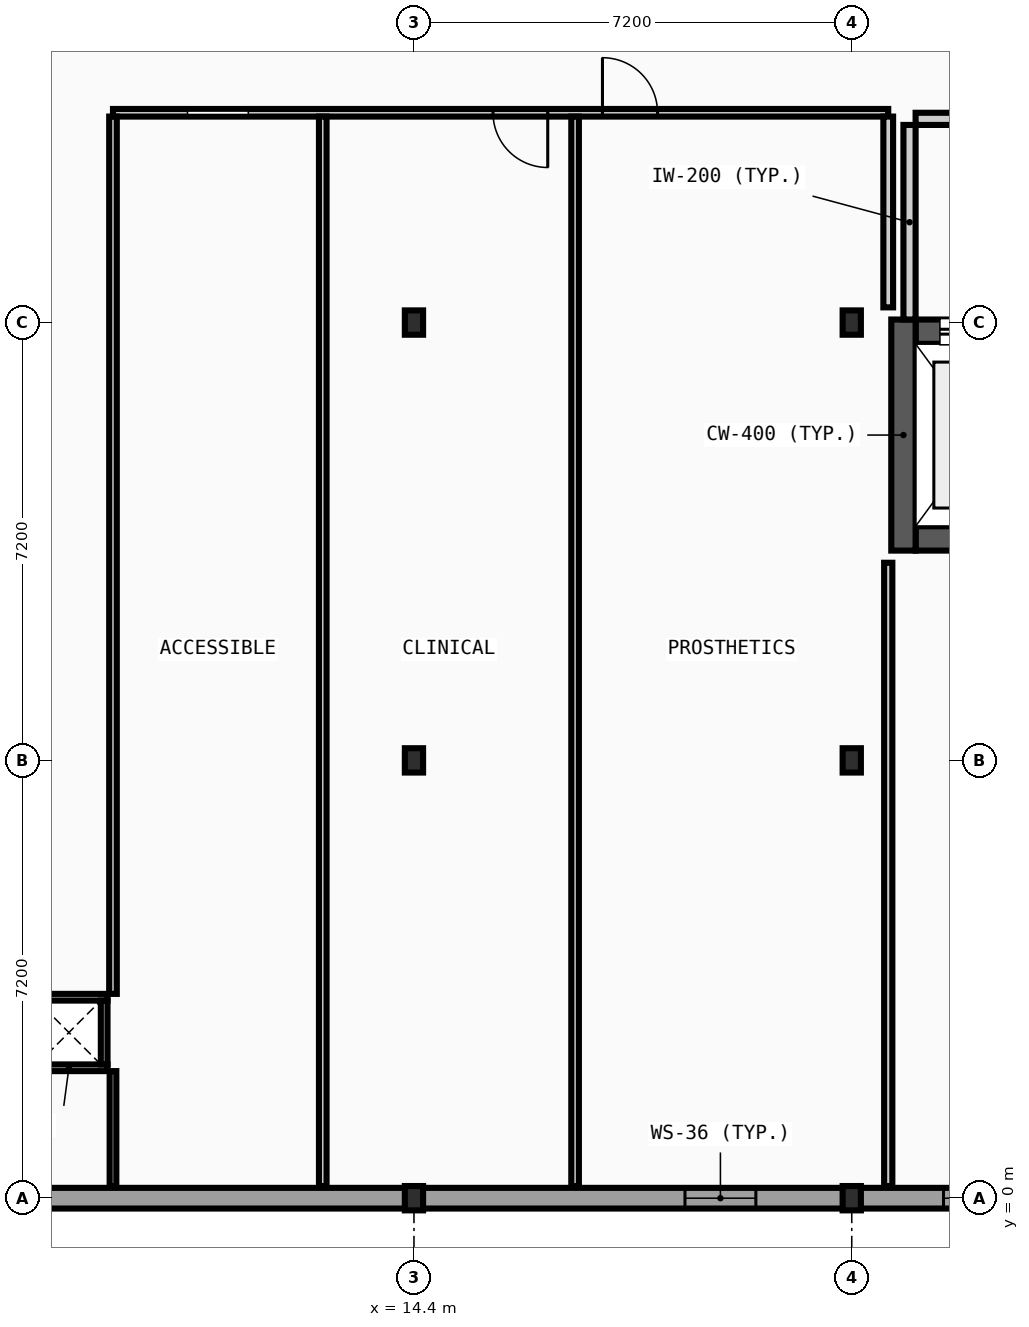
"""IFC4 building model, lengths in metres.
Left out: names, types, materials, properties, quantities, classifications, styles, units other than length and angle.
Written with IfcOpenShell. Run it as: python <this file> out.ifc"""

import sys

from ifc_helpers import new_model, si_unit, direction, frame, frame_2d, origin, origin_2d, place, context, subcontext, project, spatial, rectangle, i_section, extrude, element, fill, save


model = new_model("IFC4")
c1 = context("Model", 3, precision=1e-05, world=origin(), true_north=direction((0.0, 1.0)))
c2 = subcontext(c1, "Body", "Model", "MODEL_VIEW")
j1 = project(units=[si_unit("LENGTHUNIT", "METRE"), si_unit("PLANEANGLEUNIT", "RADIAN")], contexts=[c1])
p1 = place(None, origin())
s1 = spatial("IfcSite", under=j1, at=p1, CompositionType="ELEMENT")
p2 = place(p1, origin())
s2 = spatial("IfcBuilding", under=s1, at=p2, CompositionType="ELEMENT")
p3 = place(p2, frame((0.0, 0.0, 14.0)))
s3 = spatial("IfcBuildingStorey", under=s2, at=p3, CompositionType="ELEMENT", Elevation=14.0)
for number, where, z_axis, x_axis in (
    (1, (14.4, 0.0, 0.0), (0.0, 0.0, 1.0), (1.0, 0.0, 0.0)),
    (2, (14.4, 7.2, 0.0), (0.0, 0.0, 1.0), (1.0, 0.0, 0.0)),
    (3, (14.4, 14.4, 0.0), (0.0, 0.0, 1.0), (1.0, 0.0, 0.0)),
    (4, (21.6, 0.0, 0.0), (0.0, 0.0, 1.0), (1.0, 0.0, 0.0)),
    (5, (21.6, 7.2, 0.0), (0.0, 0.0, 1.0), (1.0, 0.0, 0.0)),
    (6, (21.6, 14.4, 0.0), (0.0, 0.0, 1.0), (1.0, 0.0, 0.0)),
):
    element("IfcColumn", number, at=place(p3, frame(where, z_axis=z_axis, x_axis=x_axis)), inside=s3, PredefinedType="COLUMN", context=c2, shape_type="SweptSolid", body=[
        extrude(i_section(OverallWidth=0.3, OverallDepth=0.4, WebThickness=0.013, FlangeThickness=0.024, FilletRadius=0.027, at=origin_2d()), origin(), (0.0, 0.0, 1.0), 4.4),
    ])
p4 = place(p3, frame((7.2, 0.0, 0.0), z_axis=(0.0, 0.0, 1.0), x_axis=(1.0, 0.0, 0.0)))
e7 = element("IfcWall", 7, at=p4, inside=s3, PredefinedType="STANDARD", context=c2, shape_type="SweptSolid", body=[
    extrude(rectangle(XDim=7.2, YDim=0.34, at=frame_2d((3.6, 0.0))), origin(), (0.0, 0.0, 1.0), 3.935),
])
p5 = place(p3, frame((14.4, 0.0, 0.0), z_axis=(0.0, 0.0, 1.0), x_axis=(1.0, 0.0, 0.0)))
e8 = element("IfcWall", 8, at=p5, inside=s3, PredefinedType="STANDARD", context=c2, shape_type="SweptSolid", body=[
    extrude(rectangle(XDim=7.2, YDim=0.34, at=frame_2d((3.6, 0.0))), origin(), (0.0, 0.0, 1.0), 3.935),
])
p6 = place(p5, frame((4.457, 0.0, 0.95)))
e9 = element("IfcOpeningElement", 9, at=p6, cuts=e8, PredefinedType="OPENING", context=c2, shape_type="SweptSolid", body=[
    extrude(rectangle(XDim=1.166, YDim=1.332, at=frame_2d((0.583, 0.666))), frame((0.0, 0.18, 0.0), z_axis=(0.0, -1.0, 0.0), x_axis=(1.0, 0.0, 0.0)), (0.0, 0.0, 1.0), 0.36),
])
p7 = place(p3, frame((21.6, 0.0, 0.0), z_axis=(0.0, 0.0, 1.0), x_axis=(1.0, 0.0, 0.0)))
e10 = element("IfcWall", 10, at=p7, inside=s3, PredefinedType="STANDARD", context=c2, shape_type="SweptSolid", body=[
    extrude(rectangle(XDim=7.03, YDim=0.34, at=frame_2d((3.515, 0.0))), origin(), (0.0, 0.0, 1.0), 3.935),
])
p8 = place(p7, frame((1.509, 0.0, 0.95)))
e11 = element("IfcOpeningElement", 11, at=p8, cuts=e10, PredefinedType="OPENING", context=c2, shape_type="SweptSolid", body=[
    extrude(rectangle(XDim=1.2, YDim=1.332, at=frame_2d((0.6, 0.666))), frame((0.0, 0.18, 0.0), z_axis=(0.0, -1.0, 0.0), x_axis=(1.0, 0.0, 0.0)), (0.0, 0.0, 1.0), 0.36),
])
p9 = place(p7, frame((4.321, 0.0, 0.95)))
e12 = element("IfcOpeningElement", 12, at=p9, cuts=e10, PredefinedType="OPENING", context=c2, shape_type="SweptSolid", body=[
    extrude(rectangle(XDim=1.2, YDim=1.332, at=frame_2d((0.6, 0.666))), frame((0.0, 0.18, 0.0), z_axis=(0.0, -1.0, 0.0), x_axis=(1.0, 0.0, 0.0)), (0.0, 0.0, 1.0), 0.36),
])
p10 = place(p3, frame((22.65, 10.85, 0.0), z_axis=(0.0, 0.0, 1.0), x_axis=(1.0, 0.0, 0.0)))
e13 = element("IfcWall", 13, at=p10, inside=s3, PredefinedType="SHEAR", context=c2, shape_type="SweptSolid", body=[
    extrude(rectangle(XDim=2.2, YDim=0.4, at=frame_2d((1.1, 0.0))), origin(), (0.0, 0.0, 1.0), 4.2),
])
p11 = place(p3, frame((22.65, 14.25, 0.0), z_axis=(0.0, 0.0, 1.0), x_axis=(1.0, 0.0, 0.0)))
e14 = element("IfcWall", 14, at=p11, inside=s3, PredefinedType="SHEAR", context=c2, shape_type="SweptSolid", body=[
    extrude(rectangle(XDim=2.2, YDim=0.4, at=frame_2d((1.1, 0.0))), origin(), (0.0, 0.0, 1.0), 4.2),
])
p12 = place(p11, frame((0.4, 0.0, 0.0)))
e15 = element("IfcOpeningElement", 15, at=p12, cuts=e14, PredefinedType="OPENING", context=c2, shape_type="SweptSolid", body=[
    extrude(rectangle(XDim=1.4, YDim=2.2, at=frame_2d((0.7, 1.1))), frame((0.0, 0.21, 0.0), z_axis=(0.0, -1.0, 0.0), x_axis=(1.0, 0.0, 0.0)), (0.0, 0.0, 1.0), 0.42),
])
p13 = place(p3, frame((22.45, 10.65, 0.0), z_axis=(0.0, 0.0, 1.0), x_axis=(0.0, 1.0, 0.0)))
e16 = element("IfcWall", 16, at=p13, inside=s3, PredefinedType="SHEAR", context=c2, shape_type="SweptSolid", body=[
    extrude(rectangle(XDim=3.8, YDim=0.4, at=frame_2d((1.9, 0.0))), origin(), (0.0, 0.0, 1.0), 4.2),
])
p14 = place(p3, frame((22.65, 17.75, 0.0), z_axis=(0.0, 0.0, 1.0), x_axis=(1.0, 0.0, 0.0)))
e17 = element("IfcWall", 17, at=p14, inside=s3, PredefinedType="PARTITIONING", context=c2, shape_type="SweptSolid", body=[
    extrude(rectangle(XDim=5.75, YDim=0.2, at=frame_2d((2.875, 0.0))), origin(), (0.0, 0.0, 1.0), 4.2),
])
p15 = place(p14, frame((2.075, 0.0, 0.0)))
e18 = element("IfcOpeningElement", 18, at=p15, cuts=e17, PredefinedType="OPENING", context=c2, shape_type="SweptSolid", body=[
    extrude(rectangle(XDim=1.6, YDim=2.2, at=frame_2d((0.8, 1.1))), frame((0.0, 0.11, 0.0), z_axis=(0.0, -1.0, 0.0), x_axis=(1.0, 0.0, 0.0)), (0.0, 0.0, 1.0), 0.22),
])
p16 = place(p3, frame((22.55, 14.45, 0.0), z_axis=(0.0, 0.0, 1.0), x_axis=(0.0, 1.0, 0.0)))
e19 = element("IfcWall", 19, at=p16, inside=s3, PredefinedType="PARTITIONING", context=c2, shape_type="SweptSolid", body=[
    extrude(rectangle(XDim=3.2, YDim=0.2, at=frame_2d((1.6, 0.0))), origin(), (0.0, 0.0, 1.0), 4.2),
])
for number, where, z_axis, x_axis in (
    (20, (8.09, 2.145, 0.0), (0.0, 0.0, 1.0), (1.0, 0.0, 0.0)),
    (21, (8.09, 3.305, 0.0), (0.0, 0.0, 1.0), (1.0, 0.0, 0.0)),
):
    element("IfcWall", number, at=place(p3, frame(where, z_axis=z_axis, x_axis=x_axis)), inside=s3, PredefinedType="PARTITIONING", context=c2, shape_type="SweptSolid", body=[
        extrude(rectangle(XDim=1.27, YDim=0.11, at=frame_2d((0.635, 0.0))), origin(), (0.0, 0.0, 1.0), 4.2),
    ])
p17 = place(p3, frame((9.305, 2.2, 0.0), z_axis=(0.0, 0.0, 1.0), x_axis=(0.0, 1.0, 0.0)))
e22 = element("IfcWall", 22, at=p17, inside=s3, PredefinedType="PARTITIONING", context=c2, shape_type="SweptSolid", body=[
    extrude(rectangle(XDim=1.05, YDim=0.11, at=frame_2d((0.525, 0.0))), origin(), (0.0, 0.0, 1.0), 4.2),
])
p18 = place(p3, frame((9.45, 17.85, 0.0), z_axis=(0.0, 0.0, 1.0), x_axis=(1.0, 0.0, 0.0)))
e23 = element("IfcWall", 23, at=p18, inside=s3, PredefinedType="PARTITIONING", context=c2, shape_type="SweptSolid", body=[
    extrude(rectangle(XDim=12.75, YDim=0.125, at=frame_2d((6.375, 0.0))), origin(), (0.0, 0.0, 1.0), 4.2),
])
p19 = place(p18, frame((1.225, 0.0, 0.0)))
e24 = element("IfcOpeningElement", 24, at=p19, cuts=e23, PredefinedType="OPENING", context=c2, shape_type="SweptSolid", body=[
    extrude(rectangle(XDim=1.0, YDim=2.1, at=frame_2d((0.5, 1.05))), frame((0.0, 0.073, 0.0), z_axis=(0.0, -1.0, 0.0), x_axis=(1.0, 0.0, 0.0)), (0.0, 0.0, 1.0), 0.145),
])
p20 = place(p18, frame((6.25, 0.0, 0.0)))
e25 = element("IfcOpeningElement", 25, at=p20, cuts=e23, PredefinedType="OPENING", context=c2, shape_type="SweptSolid", body=[
    extrude(rectangle(XDim=0.9, YDim=2.1, at=frame_2d((0.45, 1.05))), frame((0.0, 0.073, 0.0), z_axis=(0.0, -1.0, 0.0), x_axis=(1.0, 0.0, 0.0)), (0.0, 0.0, 1.0), 0.145),
])
p21 = place(p18, frame((8.05, 0.0, 0.0)))
e26 = element("IfcOpeningElement", 26, at=p21, cuts=e23, PredefinedType="OPENING", context=c2, shape_type="SweptSolid", body=[
    extrude(rectangle(XDim=0.906, YDim=2.04, at=frame_2d((0.453, 1.02))), frame((0.0, 0.073, 0.0), z_axis=(0.0, -1.0, 0.0), x_axis=(1.0, 0.0, 0.0)), (0.0, 0.0, 1.0), 0.145),
])
p22 = place(p3, frame((9.45, 0.2, 0.0), z_axis=(0.0, 0.0, 1.0), x_axis=(0.0, 1.0, 0.0)))
e27 = element("IfcWall", 27, at=p22, inside=s3, PredefinedType="PARTITIONING", context=c2, shape_type="SweptSolid", body=[
    extrude(rectangle(XDim=1.89, YDim=0.11, at=frame_2d((0.945, 0.0))), origin(), (0.0, 0.0, 1.0), 3.945),
])
p23 = place(p3, frame((9.45, 3.36, 0.0), z_axis=(0.0, 0.0, 1.0), x_axis=(0.0, 1.0, 0.0)))
e28 = element("IfcWall", 28, at=p23, inside=s3, PredefinedType="PARTITIONING", context=c2, shape_type="SweptSolid", body=[
    extrude(rectangle(XDim=14.427, YDim=0.125, at=frame_2d((7.214, 0.0))), origin(), (0.0, 0.0, 1.0), 3.945),
])
for number, where, z_axis, x_axis in (
    (29, (12.9, 0.2, 0.0), (0.0, 0.0, 1.0), (0.0, 1.0, 0.0)),
    (30, (17.05, 0.2, 0.0), (0.0, 0.0, 1.0), (0.0, 1.0, 0.0)),
):
    element("IfcWall", number, at=place(p3, frame(where, z_axis=z_axis, x_axis=x_axis)), inside=s3, PredefinedType="PARTITIONING", context=c2, shape_type="SweptSolid", body=[
        extrude(rectangle(XDim=17.588, YDim=0.125, at=frame_2d((8.794, 0.0))), origin(), (0.0, 0.0, 1.0), 4.2),
    ])
p24 = place(p3, frame((22.2, 0.2, 0.0), z_axis=(0.0, 0.0, 1.0), x_axis=(0.0, 1.0, 0.0)))
e31 = element("IfcWall", 31, at=p24, inside=s3, PredefinedType="PARTITIONING", context=c2, shape_type="SweptSolid", body=[
    extrude(rectangle(XDim=10.25, YDim=0.135, at=frame_2d((5.125, 0.0))), origin(), (0.0, 0.0, 1.0), 4.2),
])
p25 = place(p3, frame((22.2, 14.65, 0.0), z_axis=(0.0, 0.0, 1.0), x_axis=(0.0, 1.0, 0.0)))
e32 = element("IfcWall", 32, at=p25, inside=s3, PredefinedType="PARTITIONING", context=c2, shape_type="SweptSolid", body=[
    extrude(rectangle(XDim=3.138, YDim=0.16, at=frame_2d((1.569, 0.0))), origin(), (0.0, 0.0, 1.0), 4.2),
])
p26 = place(p6, origin())
e33 = element("IfcWindow", 33, at=p26, inside=s3, PartitioningType="SINGLE_PANEL", PredefinedType="WINDOW", context=c2, shape_type="SweptSolid", body=[
    extrude(rectangle(XDim=1.166, YDim=1.332, at=frame_2d((0.583, 0.666))), frame((0.0, 0.03, 0.0), z_axis=(0.0, -1.0, 0.0), x_axis=(1.0, 0.0, 0.0)), (0.0, 0.0, 1.0), 0.06),
])
fill(e9, e33)
p27 = place(p8, origin())
e34 = element("IfcWindow", 34, at=p27, inside=s3, PartitioningType="SINGLE_PANEL", PredefinedType="WINDOW", context=c2, shape_type="SweptSolid", body=[
    extrude(rectangle(XDim=1.2, YDim=1.332, at=frame_2d((0.6, 0.666))), frame((0.0, 0.03, 0.0), z_axis=(0.0, -1.0, 0.0), x_axis=(1.0, 0.0, 0.0)), (0.0, 0.0, 1.0), 0.06),
])
fill(e11, e34)
p28 = place(p12, origin())
e35 = element("IfcDoor", 35, at=p28, inside=s3, OperationType="SLIDING_TO_LEFT", PredefinedType="DOOR", context=c2, shape_type="SweptSolid", body=[
    extrude(rectangle(XDim=1.4, YDim=2.2, at=frame_2d((0.7, 1.1))), frame((0.0, 0.025, 0.0), z_axis=(0.0, -1.0, 0.0), x_axis=(1.0, 0.0, 0.0)), (0.0, 0.0, 1.0), 0.05),
])
fill(e15, e35)
p29 = place(p19, origin())
e36 = element("IfcDoor", 36, at=p29, inside=s3, OperationType="SLIDING_TO_LEFT", PredefinedType="DOOR", context=c2, shape_type="SweptSolid", body=[
    extrude(rectangle(XDim=1.0, YDim=2.1, at=frame_2d((0.5, 1.05))), frame((0.0, 0.025, 0.0), z_axis=(0.0, -1.0, 0.0), x_axis=(1.0, 0.0, 0.0)), (0.0, 0.0, 1.0), 0.05),
])
fill(e24, e36)
p30 = place(p20, origin())
e37 = element("IfcDoor", 37, at=p30, inside=s3, OperationType="SINGLE_SWING_RIGHT", PredefinedType="DOOR", context=c2, shape_type="SweptSolid", body=[
    extrude(rectangle(XDim=0.9, YDim=2.1, at=frame_2d((0.45, 1.05))), frame((0.0, 0.025, 0.0), z_axis=(0.0, -1.0, 0.0), x_axis=(1.0, 0.0, 0.0)), (0.0, 0.0, 1.0), 0.05),
])
fill(e25, e37)
p31 = place(p21, origin())
e38 = element("IfcDoor", 38, at=p31, inside=s3, OperationType="SINGLE_SWING_LEFT", PredefinedType="DOOR", context=c2, shape_type="SweptSolid", body=[
    extrude(rectangle(XDim=0.906, YDim=2.04, at=frame_2d((0.453, 1.02))), frame((0.0, 0.025, 0.0), z_axis=(0.0, -1.0, 0.0), x_axis=(1.0, 0.0, 0.0)), (0.0, 0.0, 1.0), 0.05),
])
fill(e26, e38)
save(model, sys.argv[1])
